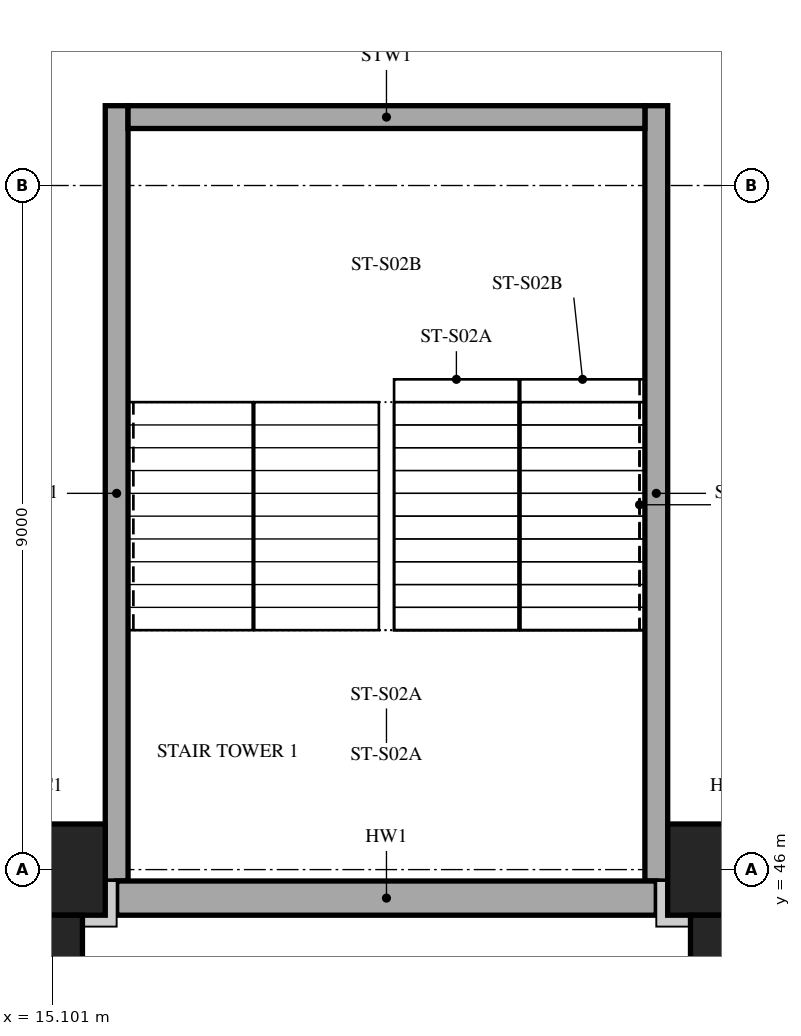
"""IFC4 building model, lengths in metres.
Left out: names, types, materials, properties, quantities, classifications, styles, units other than length and angle.
Written with IfcOpenShell. Run it as: python <this file> out.ifc"""

import sys

from ifc_helpers import new_model, si_unit, direction, frame, frame_2d, origin, origin_2d, place, context, subcontext, project, spatial, rectangle, extrude, element, save


model = new_model("IFC4")
c1 = context("Model", 3, precision=1e-05, world=origin(), true_north=direction((0.0, 1.0)))
c2 = subcontext(c1, "Body", "Model", "MODEL_VIEW")
j1 = project(units=[si_unit("LENGTHUNIT", "METRE"), si_unit("PLANEANGLEUNIT", "RADIAN")], contexts=[c1])
p1 = place(None, origin())
s1 = spatial("IfcSite", under=j1, at=p1, CompositionType="ELEMENT")
p2 = place(p1, origin())
s2 = spatial("IfcBuilding", under=s1, at=p2, CompositionType="ELEMENT")
p3 = place(p2, frame((0.0, 0.0, 5.0)))
s3 = spatial("IfcBuildingStorey", under=s2, at=p3, CompositionType="ELEMENT", Elevation=5.0)
for number, where, z_axis, x_axis in (
    (1, (15.0, 46.0, 0.0), (0.0, 0.0, 1.0), (1.0, 0.0, 0.0)),
    (2, (24.0, 46.0, 0.0), (0.0, 0.0, 1.0), (1.0, 0.0, 0.0)),
):
    element("IfcColumn", number, at=place(p3, frame(where, z_axis=z_axis, x_axis=x_axis)), inside=s3, PredefinedType="COLUMN", context=c2, shape_type="SweptSolid", body=[
        extrude(rectangle(XDim=1.6, YDim=1.2, at=origin_2d()), origin(), (0.0, 0.0, 1.0), 5.0),
    ])
for number, where, z_axis, x_axis in (
    (3, (15.95, 45.85, 0.0), (0.0, 0.0, 1.0), (0.0, 1.0, 0.0)),
    (4, (23.05, 45.85, 0.0), (0.0, 0.0, 1.0), (0.0, 1.0, 0.0)),
):
    element("IfcWall", number, at=place(p3, frame(where, z_axis=z_axis, x_axis=x_axis)), inside=s3, PredefinedType="SHEAR", context=c2, shape_type="SweptSolid", body=[
        extrude(rectangle(XDim=10.2, YDim=0.3, at=frame_2d((5.1, 0.0))), origin(), (0.0, 0.0, 1.0), 5.0),
    ])
p4 = place(p3, frame((16.1, 55.9, 0.0), z_axis=(0.0, 0.0, 1.0), x_axis=(1.0, 0.0, 0.0)))
e5 = element("IfcWall", 5, at=p4, inside=s3, PredefinedType="SHEAR", context=c2, shape_type="SweptSolid", body=[
    extrude(rectangle(XDim=6.8, YDim=0.3, at=frame_2d((3.4, 0.0))), origin(), (0.0, 0.0, 1.0), 5.0),
])
for number, where, z_axis, x_axis in (
    (6, (15.0, 44.9, 0.0), (0.0, 0.0, 1.0), (1.0, 0.0, 0.0)),
    (7, (24.0, 44.9, 0.0), (0.0, 0.0, 1.0), (1.0, 0.0, 0.0)),
):
    element("IfcColumn", number, at=place(p3, frame(where, z_axis=z_axis, x_axis=x_axis)), inside=s3, PredefinedType="COLUMN", context=c2, shape_type="SweptSolid", body=[
        extrude(rectangle(XDim=1.0, YDim=1.0, at=origin_2d()), origin(), (0.0, 0.0, 1.0), 5.0),
    ])
p5 = place(p3, frame((15.95, 45.625, 0.0), z_axis=(0.0, 0.0, 1.0), x_axis=(1.0, 0.0, 0.0)))
e8 = element("IfcWall", 8, at=p5, inside=s3, PredefinedType="SOLIDWALL", context=c2, shape_type="SweptSolid", body=[
    extrude(rectangle(XDim=7.1, YDim=0.45, at=frame_2d((3.55, 0.0))), origin(), (0.0, 0.0, 1.0), 5.0),
])
save(model, sys.argv[1])
